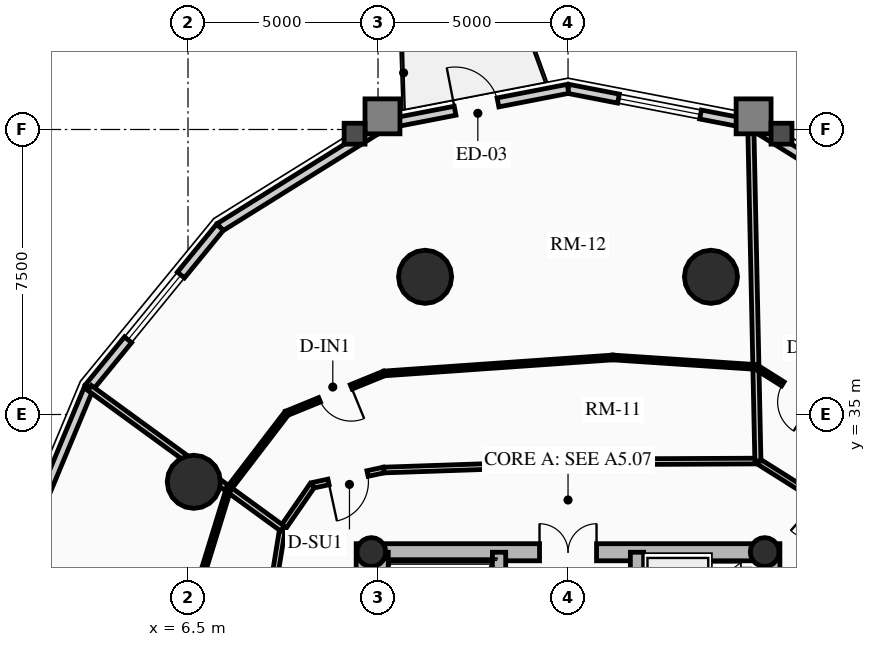
"""IFC4 building model, lengths in metres.
Left out: names, types, materials, properties, quantities, classifications, styles, units other than length and angle.
Written with IfcOpenShell. Run it as: python <this file> out.ifc"""

import sys

from ifc_helpers import new_model, si_unit, direction, frame, frame_2d, origin, origin_2d, place, context, subcontext, project, spatial, rectangle, circle, hollow_circle, extrude, source, transform, mapped, element, fill, save


model = new_model("IFC4")
c1 = context("Model", 3, precision=1e-05, world=origin(), true_north=direction((0.0, 1.0)))
c2 = subcontext(c1, "Body", "Model", "MODEL_VIEW")
j1 = project(units=[si_unit("LENGTHUNIT", "METRE"), si_unit("PLANEANGLEUNIT", "RADIAN")], contexts=[c1])
p1 = place(None, origin())
s1 = spatial("IfcSite", under=j1, at=p1, CompositionType="ELEMENT")
p2 = place(p1, origin())
s2 = spatial("IfcBuilding", under=s1, at=p2, CompositionType="ELEMENT")
p3 = place(p2, frame((0.0, 0.0, 93.43)))
s3 = spatial("IfcBuildingStorey", under=s2, at=p3, CompositionType="ELEMENT", Elevation=93.43)
for number, where, z_axis, x_axis in (
    (1, (11.15, 17.4, 0.0), (0.0, 0.0, 1.0), (0.0, 1.0, 0.0)),
    (2, (21.85, 17.4, 0.0), (0.0, 0.0, 1.0), (0.0, 1.0, 0.0)),
):
    element("IfcWall", number, at=place(p3, frame(where, z_axis=z_axis, x_axis=x_axis)), inside=s3, PredefinedType="SHEAR", context=c2, shape_type="SweptSolid", body=[
        extrude(rectangle(XDim=14.2, YDim=0.45, at=frame_2d((7.1, 0.0))), origin(), (0.0, 0.0, 1.0), 2.91),
    ])
p4 = place(p3, frame((11.15, 31.375, 0.0), z_axis=(0.0, 0.0, 1.0), x_axis=(1.0, 0.0, 0.0)))
e3 = element("IfcWall", 3, at=p4, inside=s3, PredefinedType="SHEAR", context=c2, shape_type="SweptSolid", body=[
    extrude(rectangle(XDim=10.7, YDim=0.45, at=frame_2d((5.35, 0.0))), origin(), (0.0, 0.0, 1.0), 2.91),
])
m1 = source(origin(), c2, "Body", "SweptSolid", [
    extrude(rectangle(XDim=1.5, YDim=2.02, at=frame_2d((0.75, 1.01))), frame((0.0, 0.235, 0.0), z_axis=(0.0, -1.0, 0.0), x_axis=(1.0, 0.0, 0.0)), (0.0, 0.0, 1.0), 0.47),
])
p5 = place(p4, frame((4.6, 0.0, 0.0)))
e4 = element("IfcOpeningElement", 4, at=p5, cuts=e3, PredefinedType="OPENING", context=c2, shape_type="MappedRepresentation", body=[
    mapped(m1, transform((0.0, 0.0, 0.0), x_axis=(1.0, 0.0, 0.0), y_axis=(0.0, 1.0, 0.0), z_axis=(0.0, 0.0, 1.0), scale=1.0)),
])
p6 = place(p3, frame((14.685, 17.625, 0.0), z_axis=(0.0, 0.0, 1.0), x_axis=(0.0, 1.0, 0.0)))
e5 = element("IfcWall", 5, at=p6, inside=s3, PredefinedType="SHEAR", context=c2, shape_type="SweptSolid", body=[
    extrude(rectangle(XDim=13.75, YDim=0.35, at=frame_2d((6.875, 0.0))), origin(), (0.0, 0.0, 1.0), 2.91),
])
m2 = source(origin(), c2, "Body", "SweptSolid", [
    extrude(rectangle(XDim=1.1, YDim=2.015, at=frame_2d((0.55, 1.007))), frame((0.0, 0.185, 0.0), z_axis=(0.0, -1.0, 0.0), x_axis=(1.0, 0.0, 0.0)), (0.0, 0.0, 1.0), 0.37),
])
p7 = place(p6, frame((4.875, 0.0, 0.0)))
e6 = element("IfcOpeningElement", 6, at=p7, cuts=e5, PredefinedType="OPENING", context=c2, shape_type="MappedRepresentation", body=[
    mapped(m2, transform((0.0, 0.0, 0.0), x_axis=(1.0, 0.0, 0.0), y_axis=(0.0, 1.0, 0.0), z_axis=(0.0, 0.0, 1.0), scale=1.0)),
])
m3 = source(origin(), c2, "Body", "SweptSolid", [
    extrude(rectangle(XDim=1.15, YDim=2.02, at=frame_2d((0.575, 1.01))), frame((0.0, 0.185, 0.0), z_axis=(0.0, -1.0, 0.0), x_axis=(1.0, 0.0, 0.0)), (0.0, 0.0, 1.0), 0.37),
])
p8 = place(p6, frame((7.295, 0.0, 0.0)))
e7 = element("IfcOpeningElement", 7, at=p8, cuts=e5, PredefinedType="OPENING", context=c2, shape_type="MappedRepresentation", body=[
    mapped(m3, transform((0.0, 0.0, 0.0), x_axis=(1.0, 0.0, 0.0), y_axis=(0.0, 1.0, 0.0), z_axis=(0.0, 0.0, 1.0), scale=1.0)),
])
p9 = place(p3, frame((18.315, 17.625, 0.0), z_axis=(0.0, 0.0, 1.0), x_axis=(0.0, 1.0, 0.0)))
e8 = element("IfcWall", 8, at=p9, inside=s3, PredefinedType="SHEAR", context=c2, shape_type="SweptSolid", body=[
    extrude(rectangle(XDim=13.75, YDim=0.35, at=frame_2d((6.875, 0.0))), origin(), (0.0, 0.0, 1.0), 2.91),
])
p10 = place(p9, frame((10.0, 0.0, 0.0)))
e9 = element("IfcOpeningElement", 9, at=p10, cuts=e8, PredefinedType="OPENING", context=c2, shape_type="MappedRepresentation", body=[
    mapped(m2, transform((0.0, 0.0, 0.0), x_axis=(1.0, 0.0, 0.0), y_axis=(0.0, 1.0, 0.0), z_axis=(0.0, 0.0, 1.0), scale=1.0)),
])
p11 = place(p9, frame((12.0, 0.0, 0.0)))
e10 = element("IfcOpeningElement", 10, at=p11, cuts=e8, PredefinedType="OPENING", context=c2, shape_type="MappedRepresentation", body=[
    mapped(m2, transform((0.0, 0.0, 0.0), x_axis=(1.0, 0.0, 0.0), y_axis=(0.0, 1.0, 0.0), z_axis=(0.0, 0.0, 1.0), scale=1.0)),
])
p12 = place(p9, frame((5.305, 0.0, 0.0)))
e11 = element("IfcOpeningElement", 11, at=p12, cuts=e8, PredefinedType="OPENING", context=c2, shape_type="MappedRepresentation", body=[
    mapped(m3, transform((0.0, 0.0, 0.0), x_axis=(1.0, 0.0, 0.0), y_axis=(0.0, 1.0, 0.0), z_axis=(0.0, 0.0, 1.0), scale=1.0)),
])
p13 = place(p3, frame((11.595, 24.655, 0.0), z_axis=(0.0, 0.0, 1.0), x_axis=(0.0, 1.0, 0.0)))
e12 = element("IfcWall", 12, at=p13, inside=s3, PredefinedType="SHEAR", context=c2, shape_type="SweptSolid", body=[
    extrude(rectangle(XDim=6.72, YDim=0.35, at=frame_2d((3.36, 0.0))), origin(), (0.0, 0.0, 1.0), 2.91),
])
for number, where, z_axis, x_axis in (
    (13, (11.325, 31.38, 0.0), (0.0, 0.0, 1.0), (1.0, 0.0, 0.0)),
    (14, (21.675, 31.38, 0.0), (0.0, 0.0, 1.0), (1.0, 0.0, 0.0)),
):
    element("IfcColumn", number, at=place(p3, frame(where, z_axis=z_axis, x_axis=x_axis)), inside=s3, PredefinedType="COLUMN", context=c2, shape_type="SweptSolid", body=[
        extrude(hollow_circle(Radius=0.38, WallThickness=0.032, at=origin_2d()), origin(), (0.0, 0.0, 1.0), 2.91),
    ])
for number, where, z_axis, x_axis in (
    (15, (20.261, 38.623, 0.0), (0.0, 0.0, 1.0), (1.0, 0.0, 0.0)),
    (16, (12.739, 38.623, 0.0), (0.0, 0.0, 1.0), (1.0, 0.0, 0.0)),
    (17, (6.653, 33.229, 0.0), (0.0, 0.0, 1.0), (1.0, 0.0, 0.0)),
):
    element("IfcColumn", number, at=place(p3, frame(where, z_axis=z_axis, x_axis=x_axis)), inside=s3, PredefinedType="USERDEFINED", context=c2, shape_type="SweptSolid", body=[
        extrude(circle(Radius=0.7, at=origin_2d()), origin(), (0.0, 0.0, 1.0), 2.91),
    ])
p14 = place(p3, frame((21.315, 42.637, 0.0), z_axis=(0.0, 0.0, 1.0), x_axis=(0.848520380187, -0.529162701263, 0.0)))
e18 = element("IfcWall", 18, at=p14, inside=s3, PredefinedType="SOLIDWALL", context=c2, shape_type="SweptSolid", body=[
    extrude(rectangle(XDim=5.119, YDim=0.24, at=frame_2d((2.56, 0.0))), origin(), (0.0, 0.0, 1.0), 2.179),
])
p15 = place(p3, frame((16.5, 43.57, 0.0), z_axis=(0.0, 0.0, 1.0), x_axis=(0.981723785992, -0.190311344954, 0.0)))
e19 = element("IfcWall", 19, at=p15, inside=s3, PredefinedType="SOLIDWALL", context=c2, shape_type="SweptSolid", body=[
    extrude(rectangle(XDim=4.904, YDim=0.24, at=frame_2d((2.452, 0.0))), origin(), (0.0, 0.0, 1.0), 2.179),
])
m4 = source(origin(), c2, "Body", "SweptSolid", [
    extrude(rectangle(XDim=2.2, YDim=1.35, at=frame_2d((1.1, 0.675))), frame((0.0, 0.13, 0.0), z_axis=(0.0, -1.0, 0.0), x_axis=(1.0, 0.0, 0.0)), (0.0, 0.0, 1.0), 0.26),
])
p16 = place(p15, frame((1.352, 0.0, 0.65)))
e20 = element("IfcOpeningElement", 20, at=p16, cuts=e19, PredefinedType="OPENING", context=c2, shape_type="MappedRepresentation", body=[
    mapped(m4, transform((0.0, 0.0, 0.0), x_axis=(1.0, 0.0, 0.0), y_axis=(0.0, 1.0, 0.0), z_axis=(0.0, 0.0, 1.0), scale=1.0)),
])
p17 = place(p3, frame((11.685, 42.637, 0.0), z_axis=(0.0, 0.0, 1.0), x_axis=(0.981723785992, 0.190311344954, 0.0)))
e21 = element("IfcWall", 21, at=p17, inside=s3, PredefinedType="SOLIDWALL", context=c2, shape_type="SweptSolid", body=[
    extrude(rectangle(XDim=4.904, YDim=0.24, at=frame_2d((2.452, 0.0))), origin(), (0.0, 0.0, 1.0), 2.179),
])
m5 = source(origin(), c2, "Body", "SweptSolid", [
    extrude(rectangle(XDim=1.15, YDim=2.005, at=frame_2d((0.575, 1.002))), frame((0.0, 0.13, 0.0), z_axis=(0.0, -1.0, 0.0), x_axis=(1.0, 0.0, 0.0)), (0.0, 0.0, 1.0), 0.26),
])
p18 = place(p17, frame((1.877, 0.0, 0.0)))
e22 = element("IfcOpeningElement", 22, at=p18, cuts=e21, PredefinedType="OPENING", context=c2, shape_type="MappedRepresentation", body=[
    mapped(m5, transform((0.0, 0.0, 0.0), x_axis=(1.0, 0.0, 0.0), y_axis=(0.0, 1.0, 0.0), z_axis=(0.0, 0.0, 1.0), scale=1.0)),
])
p19 = place(p3, frame((7.342, 39.928, 0.0), z_axis=(0.0, 0.0, 1.0), x_axis=(0.848520380187, 0.529162701263, 0.0)))
e23 = element("IfcWall", 23, at=p19, inside=s3, PredefinedType="SOLIDWALL", context=c2, shape_type="SweptSolid", body=[
    extrude(rectangle(XDim=5.119, YDim=0.24, at=frame_2d((2.56, 0.0))), origin(), (0.0, 0.0, 1.0), 2.179),
])
p20 = place(p3, frame((3.895, 35.709, 0.0), z_axis=(0.0, 0.0, 1.0), x_axis=(0.632700781152, 0.77439635945, 0.0)))
e24 = element("IfcWall", 24, at=p20, inside=s3, PredefinedType="SOLIDWALL", context=c2, shape_type="SweptSolid", body=[
    extrude(rectangle(XDim=5.448, YDim=0.24, at=frame_2d((2.724, 0.0))), origin(), (0.0, 0.0, 1.0), 2.179),
])
p21 = place(p20, frame((1.624, 0.0, 0.65)))
e25 = element("IfcOpeningElement", 25, at=p21, cuts=e24, PredefinedType="OPENING", context=c2, shape_type="MappedRepresentation", body=[
    mapped(m4, transform((0.0, 0.0, 0.0), x_axis=(1.0, 0.0, 0.0), y_axis=(0.0, 1.0, 0.0), z_axis=(0.0, 0.0, 1.0), scale=1.0)),
])
p22 = place(p3, frame((1.682, 30.393, 0.0), z_axis=(0.0, 0.0, 1.0), x_axis=(0.384344417632, 0.923189779317, 0.0)))
e26 = element("IfcWall", 26, at=p22, inside=s3, PredefinedType="SOLIDWALL", context=c2, shape_type="SweptSolid", body=[
    extrude(rectangle(XDim=5.758, YDim=0.24, at=frame_2d((2.879, 0.0))), origin(), (0.0, 0.0, 1.0), 2.179),
])
p23 = place(p3, frame((22.837, 32.929, 0.0), z_axis=(0.0, 0.0, 1.0), x_axis=(-0.84581079329, 0.533482991252, 0.0)))
e27 = element("IfcWall", 27, at=p23, inside=s3, PredefinedType="PARTITIONING", context=c2, shape_type="SweptSolid", body=[
    extrude(rectangle(XDim=1.585, YDim=0.15, at=frame_2d((0.792, 0.0))), origin(), (0.0, 0.0, 1.0), 2.225),
])
p24 = place(p3, frame((21.496, 33.775, 0.0), z_axis=(0.0, 0.0, 1.0), x_axis=(-0.999989544737, -0.004572790979, 0.0)))
e28 = element("IfcWall", 28, at=p24, inside=s3, PredefinedType="PARTITIONING", context=c2, shape_type="SweptSolid", body=[
    extrude(rectangle(XDim=3.364, YDim=0.15, at=frame_2d((1.682, 0.0))), origin(), (0.0, 0.0, 1.0), 2.225),
])
p25 = place(p3, frame((18.133, 33.76, 0.0), z_axis=(0.0, 0.0, 1.0), x_axis=(-0.999419643988, -0.034064280574, 0.0)))
e29 = element("IfcWall", 29, at=p25, inside=s3, PredefinedType="PARTITIONING", context=c2, shape_type="SweptSolid", body=[
    extrude(rectangle(XDim=6.486, YDim=0.15, at=frame_2d((3.243, 0.0))), origin(), (0.0, 0.0, 1.0), 2.225),
])
p26 = place(p3, frame((11.65, 33.539, 0.0), z_axis=(0.0, 0.0, 1.0), x_axis=(-0.977535921581, -0.210768882949, 0.0)))
e30 = element("IfcWall", 30, at=p26, inside=s3, PredefinedType="PARTITIONING", context=c2, shape_type="SweptSolid", body=[
    extrude(rectangle(XDim=1.923, YDim=0.15, at=frame_2d((0.961, 0.0))), origin(), (0.0, 0.0, 1.0), 2.225),
])
m6 = source(origin(), c2, "Body", "SweptSolid", [
    extrude(rectangle(XDim=1.05, YDim=2.015, at=frame_2d((0.525, 1.007))), frame((0.0, 0.085, 0.0), z_axis=(0.0, -1.0, 0.0), x_axis=(1.0, 0.0, 0.0)), (0.0, 0.0, 1.0), 0.17),
])
p27 = place(p26, frame((0.436, 0.0, 0.0)))
e31 = element("IfcOpeningElement", 31, at=p27, cuts=e30, PredefinedType="OPENING", context=c2, shape_type="MappedRepresentation", body=[
    mapped(m6, transform((0.0, 0.0, 0.0), x_axis=(1.0, 0.0, 0.0), y_axis=(0.0, 1.0, 0.0), z_axis=(0.0, 0.0, 1.0), scale=1.0)),
])
p28 = place(p3, frame((9.771, 33.133, 0.0), z_axis=(0.0, 0.0, 1.0), x_axis=(-0.568464531016, -0.822707771312, 0.0)))
e32 = element("IfcWall", 32, at=p28, inside=s3, PredefinedType="PARTITIONING", context=c2, shape_type="SweptSolid", body=[
    extrude(rectangle(XDim=1.38, YDim=0.15, at=frame_2d((0.69, 0.0))), origin(), (0.0, 0.0, 1.0), 2.225),
])
p29 = place(p3, frame((8.986, 31.998, 0.0), z_axis=(0.0, 0.0, 1.0), x_axis=(-0.158992972351, -0.98727971454, 0.0)))
e33 = element("IfcWall", 33, at=p29, inside=s3, PredefinedType="PARTITIONING", context=c2, shape_type="SweptSolid", body=[
    extrude(rectangle(XDim=1.539, YDim=0.15, at=frame_2d((0.769, 0.0))), origin(), (0.0, 0.0, 1.0), 2.225),
])
p30 = place(p3, frame((21.496, 33.775, 0.0), z_axis=(0.0, 0.0, 1.0), x_axis=(-0.021226580265, 0.999774690763, 0.0)))
e34 = element("IfcWall", 34, at=p30, inside=s3, PredefinedType="PARTITIONING", context=c2, shape_type="SweptSolid", body=[
    extrude(rectangle(XDim=8.845, YDim=0.16, at=frame_2d((4.422, 0.0))), origin(), (0.0, 0.0, 1.0), 2.179),
])
p31 = place(p3, frame((8.986, 31.998, 0.0), z_axis=(0.0, 0.0, 1.0), x_axis=(-0.808130498411, 0.589003478375, 0.0)))
e35 = element("IfcWall", 35, at=p31, inside=s3, PredefinedType="PARTITIONING", context=c2, shape_type="SweptSolid", body=[
    extrude(rectangle(XDim=6.281, YDim=0.16, at=frame_2d((3.14, 0.0))), origin(), (0.0, 0.0, 1.0), 2.179),
])
p32 = place(p3, frame((23.624, 34.884, 0.0), z_axis=(0.0, 0.0, 1.0), x_axis=(-0.84728326465, 0.531141289531, 0.0)))
e36 = element("IfcWall", 36, at=p32, inside=s3, PredefinedType="PARTITIONING", context=c2, shape_type="SweptSolid", body=[
    extrude(rectangle(XDim=2.573, YDim=0.125, at=frame_2d((1.287, 0.0))), origin(), (0.0, 0.0, 1.0), 2.225),
])
m7 = source(origin(), c2, "Body", "SweptSolid", [
    extrude(rectangle(XDim=0.9, YDim=2.005, at=frame_2d((0.45, 1.002))), frame((0.0, 0.073, 0.0), z_axis=(0.0, -1.0, 0.0), x_axis=(1.0, 0.0, 0.0)), (0.0, 0.0, 1.0), 0.145),
])
p33 = place(p32, frame((0.836, 0.0, 0.0)))
e37 = element("IfcOpeningElement", 37, at=p33, cuts=e36, PredefinedType="OPENING", context=c2, shape_type="MappedRepresentation", body=[
    mapped(m7, transform((0.0, 0.0, 0.0), x_axis=(1.0, 0.0, 0.0), y_axis=(0.0, 1.0, 0.0), z_axis=(0.0, 0.0, 1.0), scale=1.0)),
])
p34 = place(p3, frame((21.444, 36.251, 0.0), z_axis=(0.0, 0.0, 1.0), x_axis=(-0.997810544349, 0.066137112017, 0.0)))
e38 = element("IfcWall", 38, at=p34, inside=s3, PredefinedType="PARTITIONING", context=c2, shape_type="SweptSolid", body=[
    extrude(rectangle(XDim=3.776, YDim=0.125, at=frame_2d((1.888, 0.0))), origin(), (0.0, 0.0, 1.0), 2.225),
])
p35 = place(p3, frame((17.676, 36.501, 0.0), z_axis=(0.0, 0.0, 1.0), x_axis=(-0.997570913993, -0.069658248298, 0.0)))
e39 = element("IfcWall", 39, at=p35, inside=s3, PredefinedType="PARTITIONING", context=c2, shape_type="SweptSolid", body=[
    extrude(rectangle(XDim=6.028, YDim=0.125, at=frame_2d((3.014, 0.0))), origin(), (0.0, 0.0, 1.0), 2.225),
])
p36 = place(p3, frame((11.662, 36.081, 0.0), z_axis=(0.0, 0.0, 1.0), x_axis=(-0.925664670378, -0.378344972234, 0.0)))
e40 = element("IfcWall", 40, at=p36, inside=s3, PredefinedType="PARTITIONING", context=c2, shape_type="SweptSolid", body=[
    extrude(rectangle(XDim=2.774, YDim=0.125, at=frame_2d((1.387, 0.0))), origin(), (0.0, 0.0, 1.0), 2.225),
])
p37 = place(p36, frame((0.937, 0.0, 0.0)))
e41 = element("IfcOpeningElement", 41, at=p37, cuts=e40, PredefinedType="OPENING", context=c2, shape_type="MappedRepresentation", body=[
    mapped(m7, transform((0.0, 0.0, 0.0), x_axis=(1.0, 0.0, 0.0), y_axis=(0.0, 1.0, 0.0), z_axis=(0.0, 0.0, 1.0), scale=1.0)),
])
p38 = place(p3, frame((9.094, 35.031, 0.0), z_axis=(0.0, 0.0, 1.0), x_axis=(-0.607813927368, -0.794079485755, 0.0)))
e42 = element("IfcWall", 42, at=p38, inside=s3, PredefinedType="PARTITIONING", context=c2, shape_type="SweptSolid", body=[
    extrude(rectangle(XDim=2.515, YDim=0.125, at=frame_2d((1.258, 0.0))), origin(), (0.0, 0.0, 1.0), 2.655),
])
p39 = place(p3, frame((7.565, 33.034, 0.0), z_axis=(0.0, 0.0, 1.0), x_axis=(-0.294365365095, -0.955692958974, 0.0)))
e43 = element("IfcWall", 43, at=p39, inside=s3, PredefinedType="PARTITIONING", context=c2, shape_type="SweptSolid", body=[
    extrude(rectangle(XDim=2.7, YDim=0.125, at=frame_2d((1.35, 0.0))), origin(), (0.0, 0.0, 1.0), 2.225),
])
m8 = source(origin(), c2, "Body", "SweptSolid", [
    extrude(rectangle(XDim=2.2, YDim=1.35, at=frame_2d((1.1, 0.675))), frame((0.0, 0.03, 0.0), z_axis=(0.0, -1.0, 0.0), x_axis=(1.0, 0.0, 0.0)), (0.0, 0.0, 1.0), 0.06),
])
p40 = place(p16, origin())
e44 = element("IfcWindow", 44, at=p40, inside=s3, PartitioningType="DOUBLE_PANEL_VERTICAL", PredefinedType="WINDOW", context=c2, shape_type="MappedRepresentation", body=[
    mapped(m8, transform((0.0, 0.0, 0.0), x_axis=(1.0, 0.0, 0.0), y_axis=(0.0, 1.0, 0.0), z_axis=(0.0, 0.0, 1.0), scale=1.0)),
])
fill(e20, e44)
m9 = source(origin(), c2, "Body", "SweptSolid", [
    extrude(rectangle(XDim=1.15, YDim=2.005, at=frame_2d((0.575, 1.002))), frame((0.0, 0.025, 0.0), z_axis=(0.0, -1.0, 0.0), x_axis=(1.0, 0.0, 0.0)), (0.0, 0.0, 1.0), 0.05),
])
p41 = place(p18, origin())
e45 = element("IfcDoor", 45, at=p41, inside=s3, OperationType="SINGLE_SWING_LEFT", PredefinedType="DOOR", context=c2, shape_type="MappedRepresentation", body=[
    mapped(m9, transform((0.0, 0.0, 0.0), x_axis=(1.0, 0.0, 0.0), y_axis=(0.0, 1.0, 0.0), z_axis=(0.0, 0.0, 1.0), scale=1.0)),
])
fill(e22, e45)
p42 = place(p21, origin())
e46 = element("IfcWindow", 46, at=p42, inside=s3, PartitioningType="DOUBLE_PANEL_VERTICAL", PredefinedType="WINDOW", context=c2, shape_type="MappedRepresentation", body=[
    mapped(m8, transform((0.0, 0.0, 0.0), x_axis=(1.0, 0.0, 0.0), y_axis=(0.0, 1.0, 0.0), z_axis=(0.0, 0.0, 1.0), scale=1.0)),
])
fill(e25, e46)
m10 = source(origin(), c2, "Body", "SweptSolid", [
    extrude(rectangle(XDim=1.5, YDim=2.02, at=frame_2d((0.75, 1.01))), frame((0.0, 0.025, 0.0), z_axis=(0.0, -1.0, 0.0), x_axis=(1.0, 0.0, 0.0)), (0.0, 0.0, 1.0), 0.05),
])
p43 = place(p5, origin())
e47 = element("IfcDoor", 47, at=p43, inside=s3, OperationType="DOUBLE_DOOR_SINGLE_SWING", PredefinedType="DOOR", context=c2, shape_type="MappedRepresentation", body=[
    mapped(m10, transform((0.0, 0.0, 0.0), x_axis=(1.0, 0.0, 0.0), y_axis=(0.0, 1.0, 0.0), z_axis=(0.0, 0.0, 1.0), scale=1.0)),
])
fill(e4, e47)
m11 = source(origin(), c2, "Body", "SweptSolid", [
    extrude(rectangle(XDim=0.9, YDim=2.005, at=frame_2d((0.45, 1.002))), frame((0.0, 0.025, 0.0), z_axis=(0.0, -1.0, 0.0), x_axis=(1.0, 0.0, 0.0)), (0.0, 0.0, 1.0), 0.05),
])
p44 = place(p33, origin())
e48 = element("IfcDoor", 48, at=p44, inside=s3, OperationType="SINGLE_SWING_LEFT", PredefinedType="DOOR", context=c2, shape_type="MappedRepresentation", body=[
    mapped(m11, transform((0.0, 0.0, 0.0), x_axis=(1.0, 0.0, 0.0), y_axis=(0.0, 1.0, 0.0), z_axis=(0.0, 0.0, 1.0), scale=1.0)),
])
fill(e37, e48)
m12 = source(origin(), c2, "Body", "SweptSolid", [
    extrude(rectangle(XDim=1.05, YDim=2.015, at=frame_2d((0.525, 1.007))), frame((0.0, 0.025, 0.0), z_axis=(0.0, -1.0, 0.0), x_axis=(1.0, 0.0, 0.0)), (0.0, 0.0, 1.0), 0.05),
])
p45 = place(p27, origin())
e49 = element("IfcDoor", 49, at=p45, inside=s3, OperationType="SINGLE_SWING_RIGHT", PredefinedType="DOOR", context=c2, shape_type="MappedRepresentation", body=[
    mapped(m12, transform((0.0, 0.0, 0.0), x_axis=(1.0, 0.0, 0.0), y_axis=(0.0, 1.0, 0.0), z_axis=(0.0, 0.0, 1.0), scale=1.0)),
])
fill(e31, e49)
p46 = place(p37, origin())
e50 = element("IfcDoor", 50, at=p46, inside=s3, OperationType="SINGLE_SWING_LEFT", PredefinedType="DOOR", context=c2, shape_type="MappedRepresentation", body=[
    mapped(m11, transform((0.0, 0.0, 0.0), x_axis=(1.0, 0.0, 0.0), y_axis=(0.0, 1.0, 0.0), z_axis=(0.0, 0.0, 1.0), scale=1.0)),
])
fill(e41, e50)
save(model, sys.argv[1])
